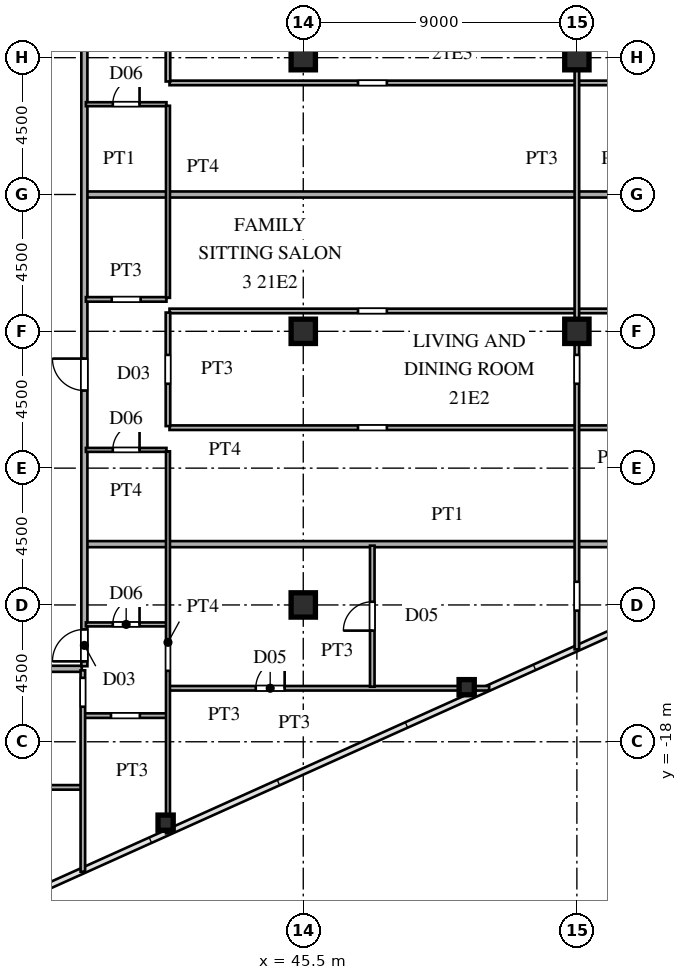
"""IFC4 building model, lengths in metres.
Left out: names, types, materials, properties, quantities, classifications, styles, units other than length and angle.
Written with IfcOpenShell. Run it as: python <this file> out.ifc"""

import sys

from ifc_helpers import new_model, si_unit, direction, frame, frame_2d, origin, origin_2d, place, context, subcontext, project, spatial, rectangle, hollow_rectangle, i_section, extrude, source, transform, mapped, element, fill, save


model = new_model("IFC4")
c1 = context("Model", 3, precision=1e-05, world=origin(), true_north=direction((0.0, 1.0)))
c2 = subcontext(c1, "Body", "Model", "MODEL_VIEW")
j1 = project(units=[si_unit("LENGTHUNIT", "METRE"), si_unit("PLANEANGLEUNIT", "RADIAN")], contexts=[c1])
p1 = place(None, origin())
s1 = spatial("IfcSite", under=j1, at=p1, CompositionType="ELEMENT")
p2 = place(p1, origin())
s2 = spatial("IfcBuilding", under=s1, at=p2, CompositionType="ELEMENT")
p3 = place(p2, frame((0.0, 0.0, 80.1)))
s3 = spatial("IfcBuildingStorey", under=s2, at=p3, CompositionType="ELEMENT", Elevation=80.1)
m1 = source(origin(), c2, "Body", "SweptSolid", [
    extrude(i_section(OverallWidth=0.8, OverallDepth=0.8, WebThickness=0.032, FlangeThickness=0.05, at=origin_2d()), origin(), (0.0, 0.0, 1.0), 3.6),
])
for number, where, z_axis, x_axis in (
    (1, (45.5, -13.5, 0.0), (0.0, 0.0, 1.0), (1.0, 0.0, 0.0)),
    (2, (45.5, -4.5, 0.0), (0.0, 0.0, 1.0), (1.0, 0.0, 0.0)),
    (3, (45.5, 4.5, 0.0), (0.0, 0.0, 1.0), (1.0, 0.0, 0.0)),
    (4, (54.5, -4.5, 0.0), (0.0, 0.0, 1.0), (1.0, 0.0, 0.0)),
    (5, (54.5, 4.5, 0.0), (0.0, 0.0, 1.0), (1.0, 0.0, 0.0)),
):
    element("IfcColumn", number, at=place(p3, frame(where, z_axis=z_axis, x_axis=x_axis)), inside=s3, PredefinedType="COLUMN", context=c2, shape_type="MappedRepresentation", body=[
        mapped(m1, transform((0.0, 0.0, 0.0), scale=1.0)),
    ])
m2 = source(origin(), c2, "Body", "SweptSolid", [
    extrude(hollow_rectangle(XDim=0.5, YDim=0.5, WallThickness=0.02, at=origin_2d()), origin(), (0.0, 0.0, 1.0), 3.6),
])
for number, where, z_axis, x_axis in (
    (6, (40.973, -20.661, 0.0), (0.0, 0.0, 1.0), (1.0, 0.0, 0.0)),
    (7, (50.875, -16.205, 0.0), (0.0, 0.0, 1.0), (1.0, 0.0, 0.0)),
):
    element("IfcColumn", number, at=place(p3, frame(where, z_axis=z_axis, x_axis=x_axis)), inside=s3, PredefinedType="COLUMN", context=c2, shape_type="MappedRepresentation", body=[
        mapped(m2, transform((0.0, 0.0, 0.0), scale=1.0)),
    ])
p4 = place(p3, frame((27.465, -19.5, 0.0), z_axis=(0.0, 0.0, 1.0), x_axis=(1.0, 0.0, 0.0)))
e8 = element("IfcWall", 8, at=p4, inside=s3, PredefinedType="PARTITIONING", context=c2, shape_type="SweptSolid", body=[
    extrude(rectangle(XDim=10.735, YDim=0.15, at=frame_2d((5.367, 0.0))), origin(), (0.0, 0.0, 1.0), 3.38),
])
p5 = place(p4, frame((4.935, 0.0, 0.0)))
e9 = element("IfcOpeningElement", 9, at=p5, cuts=e8, PredefinedType="OPENING", context=c2, shape_type="SweptSolid", body=[
    extrude(rectangle(XDim=0.95, YDim=2.15, at=frame_2d((0.475, 1.075))), frame((0.0, 0.085, 0.0), z_axis=(0.0, -1.0, 0.0), x_axis=(1.0, 0.0, 0.0)), (0.0, 0.0, 1.0), 0.17),
])
p6 = place(p3, frame((38.3, -17.14, 0.0), z_axis=(0.0, 0.0, 1.0), x_axis=(1.0, 0.0, 0.0)))
e10 = element("IfcWall", 10, at=p6, inside=s3, PredefinedType="PARTITIONING", context=c2, shape_type="SweptSolid", body=[
    extrude(rectangle(XDim=2.7, YDim=0.15, at=frame_2d((1.35, 0.0))), origin(), (0.0, 0.0, 1.0), 3.38),
])
p7 = place(p6, frame((0.875, 0.0, 0.0)))
e11 = element("IfcOpeningElement", 11, at=p7, cuts=e10, PredefinedType="OPENING", context=c2, shape_type="SweptSolid", body=[
    extrude(rectangle(XDim=0.95, YDim=2.15, at=frame_2d((0.475, 1.075))), frame((0.0, 0.085, 0.0), z_axis=(0.0, -1.0, 0.0), x_axis=(1.0, 0.0, 0.0)), (0.0, 0.0, 1.0), 0.17),
])
p8 = place(p3, frame((41.1, -16.24, 0.0), z_axis=(0.0, 0.0, 1.0), x_axis=(1.0, 0.0, 0.0)))
e12 = element("IfcWall", 12, at=p8, inside=s3, PredefinedType="PARTITIONING", context=c2, shape_type="SweptSolid", body=[
    extrude(rectangle(XDim=10.515, YDim=0.15, at=frame_2d((5.257, 0.0))), origin(), (0.0, 0.0, 1.0), 3.38),
])
p9 = place(p8, frame((2.837, 0.0, 0.0)))
e13 = element("IfcOpeningElement", 13, at=p9, cuts=e12, PredefinedType="OPENING", context=c2, shape_type="SweptSolid", body=[
    extrude(rectangle(XDim=0.95, YDim=2.15, at=frame_2d((0.475, 1.075))), frame((0.0, 0.085, 0.0), z_axis=(0.0, -1.0, 0.0), x_axis=(1.0, 0.0, 0.0)), (0.0, 0.0, 1.0), 0.17),
])
p10 = place(p3, frame((36.585, -15.6, 0.0), z_axis=(0.0, 0.0, 1.0), x_axis=(1.0, 0.0, 0.0)))
e14 = element("IfcWall", 14, at=p10, inside=s3, PredefinedType="PARTITIONING", context=c2, shape_type="SweptSolid", body=[
    extrude(rectangle(XDim=1.63, YDim=0.2, at=frame_2d((0.815, 0.0))), origin(), (0.0, 0.0, 1.0), 3.38),
])
p11 = place(p3, frame((38.35, -14.14, 0.0), z_axis=(0.0, 0.0, 1.0), x_axis=(1.0, 0.0, 0.0)))
e15 = element("IfcWall", 15, at=p11, inside=s3, PredefinedType="PARTITIONING", context=c2, shape_type="SweptSolid", body=[
    extrude(rectangle(XDim=2.65, YDim=0.13, at=frame_2d((1.325, 0.0))), origin(), (0.0, 0.0, 1.0), 3.38),
])
p12 = place(p11, frame((0.885, 0.0, 0.0)))
e16 = element("IfcOpeningElement", 16, at=p12, cuts=e15, PredefinedType="OPENING", context=c2, shape_type="SweptSolid", body=[
    extrude(rectangle(XDim=0.88, YDim=2.1, at=frame_2d((0.44, 1.05))), frame((0.0, 0.075, 0.0), z_axis=(0.0, -1.0, 0.0), x_axis=(1.0, 0.0, 0.0)), (0.0, 0.0, 1.0), 0.15),
])
p13 = place(p3, frame((38.38, -11.5, 0.0), z_axis=(0.0, 0.0, 1.0), x_axis=(1.0, 0.0, 0.0)))
e17 = element("IfcWall", 17, at=p13, inside=s3, PredefinedType="PARTITIONING", context=c2, shape_type="SweptSolid", body=[
    extrude(rectangle(XDim=23.743, YDim=0.2, at=frame_2d((11.872, 0.0))), origin(), (0.0, 0.0, 1.0), 3.38),
])
p14 = place(p3, frame((38.35, -8.4, 0.0), z_axis=(0.0, 0.0, 1.0), x_axis=(1.0, 0.0, 0.0)))
e18 = element("IfcWall", 18, at=p14, inside=s3, PredefinedType="PARTITIONING", context=c2, shape_type="SweptSolid", body=[
    extrude(rectangle(XDim=2.65, YDim=0.13, at=frame_2d((1.325, 0.0))), origin(), (0.0, 0.0, 1.0), 3.38),
])
p15 = place(p14, frame((0.885, 0.0, 0.0)))
e19 = element("IfcOpeningElement", 19, at=p15, cuts=e18, PredefinedType="OPENING", context=c2, shape_type="SweptSolid", body=[
    extrude(rectangle(XDim=0.88, YDim=2.1, at=frame_2d((0.44, 1.05))), frame((0.0, 0.075, 0.0), z_axis=(0.0, -1.0, 0.0), x_axis=(1.0, 0.0, 0.0)), (0.0, 0.0, 1.0), 0.15),
])
p16 = place(p3, frame((41.1, -7.67, 0.0), z_axis=(0.0, 0.0, 1.0), x_axis=(1.0, 0.0, 0.0)))
e20 = element("IfcWall", 20, at=p16, inside=s3, PredefinedType="PARTITIONING", context=c2, shape_type="SweptSolid", body=[
    extrude(rectangle(XDim=29.218, YDim=0.15, at=frame_2d((14.609, 0.0))), origin(), (0.0, 0.0, 1.0), 3.38),
])
p17 = place(p16, frame((6.2, 0.0, 0.0)))
e21 = element("IfcOpeningElement", 21, at=p17, cuts=e20, PredefinedType="OPENING", context=c2, shape_type="SweptSolid", body=[
    extrude(rectangle(XDim=0.95, YDim=2.15, at=frame_2d((0.475, 1.075))), frame((0.0, 0.085, 0.0), z_axis=(0.0, -1.0, 0.0), x_axis=(1.0, 0.0, 0.0)), (0.0, 0.0, 1.0), 0.17),
])
p18 = place(p16, frame((15.775, 0.0, 0.0)))
e22 = element("IfcOpeningElement", 22, at=p18, cuts=e20, PredefinedType="OPENING", context=c2, shape_type="SweptSolid", body=[
    extrude(rectangle(XDim=0.95, YDim=2.15, at=frame_2d((0.475, 1.075))), frame((0.0, 0.085, 0.0), z_axis=(0.0, -1.0, 0.0), x_axis=(1.0, 0.0, 0.0)), (0.0, 0.0, 1.0), 0.17),
])
p19 = place(p3, frame((41.1, -3.83, 0.0), z_axis=(0.0, 0.0, 1.0), x_axis=(1.0, 0.0, 0.0)))
e23 = element("IfcWall", 23, at=p19, inside=s3, PredefinedType="PARTITIONING", context=c2, shape_type="SweptSolid", body=[
    extrude(rectangle(XDim=29.935, YDim=0.15, at=frame_2d((14.967, 0.0))), origin(), (0.0, 0.0, 1.0), 3.38),
])
p20 = place(p19, frame((6.2, 0.0, 0.0)))
e24 = element("IfcOpeningElement", 24, at=p20, cuts=e23, PredefinedType="OPENING", context=c2, shape_type="SweptSolid", body=[
    extrude(rectangle(XDim=0.95, YDim=2.15, at=frame_2d((0.475, 1.075))), frame((0.0, 0.085, 0.0), z_axis=(0.0, -1.0, 0.0), x_axis=(1.0, 0.0, 0.0)), (0.0, 0.0, 1.0), 0.17),
])
p21 = place(p19, frame((15.775, 0.0, 0.0)))
e25 = element("IfcOpeningElement", 25, at=p21, cuts=e23, PredefinedType="OPENING", context=c2, shape_type="SweptSolid", body=[
    extrude(rectangle(XDim=0.95, YDim=2.15, at=frame_2d((0.475, 1.075))), frame((0.0, 0.085, 0.0), z_axis=(0.0, -1.0, 0.0), x_axis=(1.0, 0.0, 0.0)), (0.0, 0.0, 1.0), 0.17),
])
p22 = place(p3, frame((38.35, -3.45, 0.0), z_axis=(0.0, 0.0, 1.0), x_axis=(1.0, 0.0, 0.0)))
e26 = element("IfcWall", 26, at=p22, inside=s3, PredefinedType="PARTITIONING", context=c2, shape_type="SweptSolid", body=[
    extrude(rectangle(XDim=2.65, YDim=0.15, at=frame_2d((1.325, 0.0))), origin(), (0.0, 0.0, 1.0), 3.38),
])
p23 = place(p22, frame((0.85, 0.0, 0.0)))
e27 = element("IfcOpeningElement", 27, at=p23, cuts=e26, PredefinedType="OPENING", context=c2, shape_type="SweptSolid", body=[
    extrude(rectangle(XDim=0.95, YDim=2.15, at=frame_2d((0.475, 1.075))), frame((0.0, 0.085, 0.0), z_axis=(0.0, -1.0, 0.0), x_axis=(1.0, 0.0, 0.0)), (0.0, 0.0, 1.0), 0.17),
])
p24 = place(p3, frame((38.38, 0.0, 0.0), z_axis=(0.0, 0.0, 1.0), x_axis=(1.0, 0.0, 0.0)))
e28 = element("IfcWall", 28, at=p24, inside=s3, PredefinedType="PARTITIONING", context=c2, shape_type="SweptSolid", body=[
    extrude(rectangle(XDim=25.1, YDim=0.2, at=frame_2d((12.55, 0.0))), origin(), (0.0, 0.0, 1.0), 3.38),
])
p25 = place(p3, frame((38.35, 2.97, 0.0), z_axis=(0.0, 0.0, 1.0), x_axis=(1.0, 0.0, 0.0)))
e29 = element("IfcWall", 29, at=p25, inside=s3, PredefinedType="PARTITIONING", context=c2, shape_type="SweptSolid", body=[
    extrude(rectangle(XDim=2.65, YDim=0.13, at=frame_2d((1.325, 0.0))), origin(), (0.0, 0.0, 1.0), 3.38),
])
p26 = place(p25, frame((0.885, 0.0, 0.0)))
e30 = element("IfcOpeningElement", 30, at=p26, cuts=e29, PredefinedType="OPENING", context=c2, shape_type="SweptSolid", body=[
    extrude(rectangle(XDim=0.88, YDim=2.1, at=frame_2d((0.44, 1.05))), frame((0.0, 0.075, 0.0), z_axis=(0.0, -1.0, 0.0), x_axis=(1.0, 0.0, 0.0)), (0.0, 0.0, 1.0), 0.15),
])
p27 = place(p3, frame((41.1, 3.67, 0.0), z_axis=(0.0, 0.0, 1.0), x_axis=(1.0, 0.0, 0.0)))
e31 = element("IfcWall", 31, at=p27, inside=s3, PredefinedType="PARTITIONING", context=c2, shape_type="SweptSolid", body=[
    extrude(rectangle(XDim=29.935, YDim=0.15, at=frame_2d((14.967, 0.0))), origin(), (0.0, 0.0, 1.0), 3.38),
])
p28 = place(p27, frame((6.2, 0.0, 0.0)))
e32 = element("IfcOpeningElement", 32, at=p28, cuts=e31, PredefinedType="OPENING", context=c2, shape_type="SweptSolid", body=[
    extrude(rectangle(XDim=0.95, YDim=2.15, at=frame_2d((0.475, 1.075))), frame((0.0, 0.085, 0.0), z_axis=(0.0, -1.0, 0.0), x_axis=(1.0, 0.0, 0.0)), (0.0, 0.0, 1.0), 0.17),
])
p29 = place(p27, frame((15.775, 0.0, 0.0)))
e33 = element("IfcOpeningElement", 33, at=p29, cuts=e31, PredefinedType="OPENING", context=c2, shape_type="SweptSolid", body=[
    extrude(rectangle(XDim=0.95, YDim=2.15, at=frame_2d((0.475, 1.075))), frame((0.0, 0.085, 0.0), z_axis=(0.0, -1.0, 0.0), x_axis=(1.0, 0.0, 0.0)), (0.0, 0.0, 1.0), 0.17),
])
p30 = place(p3, frame((38.25, -22.273, 0.0), z_axis=(0.0, 0.0, 1.0), x_axis=(0.0, 1.0, 0.0)))
e34 = element("IfcWall", 34, at=p30, inside=s3, PredefinedType="PARTITIONING", context=c2, shape_type="SweptSolid", body=[
    extrude(rectangle(XDim=6.623, YDim=0.15, at=frame_2d((3.312, 0.0))), origin(), (0.0, 0.0, 1.0), 3.38),
])
p31 = place(p30, frame((5.426, 0.0, 0.0)))
e35 = element("IfcOpeningElement", 35, at=p31, cuts=e34, PredefinedType="OPENING", context=c2, shape_type="SweptSolid", body=[
    extrude(rectangle(XDim=0.95, YDim=2.15, at=frame_2d((0.475, 1.075))), frame((0.0, 0.085, 0.0), z_axis=(0.0, -1.0, 0.0), x_axis=(1.0, 0.0, 0.0)), (0.0, 0.0, 1.0), 0.17),
])
p32 = place(p3, frame((38.3, -15.515, 0.0), z_axis=(0.0, 0.0, 1.0), x_axis=(0.0, 1.0, 0.0)))
e36 = element("IfcWall", 36, at=p32, inside=s3, PredefinedType="PARTITIONING", context=c2, shape_type="SweptSolid", body=[
    extrude(rectangle(XDim=31.03, YDim=0.2, at=frame_2d((15.515, 0.0))), origin(), (0.0, 0.0, 1.0), 3.38),
])
p33 = place(p32, frame((0.16, 0.0, 0.0)))
e37 = element("IfcOpeningElement", 37, at=p33, cuts=e36, PredefinedType="OPENING", context=c2, shape_type="SweptSolid", body=[
    extrude(rectangle(XDim=1.05, YDim=2.25, at=frame_2d((0.525, 1.125))), frame((0.0, 0.11, 0.0), z_axis=(0.0, -1.0, 0.0), x_axis=(1.0, 0.0, 0.0)), (0.0, 0.0, 1.0), 0.22),
])
p34 = place(p32, frame((9.067, 0.0, 0.0)))
e38 = element("IfcOpeningElement", 38, at=p34, cuts=e36, PredefinedType="OPENING", context=c2, shape_type="SweptSolid", body=[
    extrude(rectangle(XDim=1.05, YDim=2.25, at=frame_2d((0.525, 1.125))), frame((0.0, 0.11, 0.0), z_axis=(0.0, -1.0, 0.0), x_axis=(1.0, 0.0, 0.0)), (0.0, 0.0, 1.0), 0.22),
])
p35 = place(p32, frame((20.325, 0.0, 0.0)))
e39 = element("IfcOpeningElement", 39, at=p35, cuts=e36, PredefinedType="OPENING", context=c2, shape_type="SweptSolid", body=[
    extrude(rectangle(XDim=1.05, YDim=2.25, at=frame_2d((0.525, 1.125))), frame((0.0, 0.11, 0.0), z_axis=(0.0, -1.0, 0.0), x_axis=(1.0, 0.0, 0.0)), (0.0, 0.0, 1.0), 0.22),
])
p36 = place(p32, frame((29.613, 0.0, 0.0)))
e40 = element("IfcOpeningElement", 40, at=p36, cuts=e36, PredefinedType="OPENING", context=c2, shape_type="SweptSolid", body=[
    extrude(rectangle(XDim=1.05, YDim=2.25, at=frame_2d((0.525, 1.125))), frame((0.0, 0.11, 0.0), z_axis=(0.0, -1.0, 0.0), x_axis=(1.0, 0.0, 0.0)), (0.0, 0.0, 1.0), 0.22),
])
p37 = place(p3, frame((41.05, -21.012, 0.0), z_axis=(0.0, 0.0, 1.0), x_axis=(0.0, 1.0, 0.0)))
e41 = element("IfcWall", 41, at=p37, inside=s3, PredefinedType="PARTITIONING", context=c2, shape_type="SweptSolid", body=[
    extrude(rectangle(XDim=12.565, YDim=0.13, at=frame_2d((6.282, 0.0))), origin(), (0.0, 0.0, 1.0), 2.99),
])
p38 = place(p37, frame((5.345, 0.0, 0.0)))
e42 = element("IfcOpeningElement", 42, at=p38, cuts=e41, PredefinedType="OPENING", context=c2, shape_type="SweptSolid", body=[
    extrude(rectangle(XDim=0.95, YDim=2.15, at=frame_2d((0.475, 1.075))), frame((0.0, 0.075, 0.0), z_axis=(0.0, -1.0, 0.0), x_axis=(1.0, 0.0, 0.0)), (0.0, 0.0, 1.0), 0.15),
])
p39 = place(p3, frame((41.05, -7.617, 0.0), z_axis=(0.0, 0.0, 1.0), x_axis=(0.0, 1.0, 0.0)))
e43 = element("IfcWall", 43, at=p39, inside=s3, PredefinedType="PARTITIONING", context=c2, shape_type="SweptSolid", body=[
    extrude(rectangle(XDim=3.734, YDim=0.15, at=frame_2d((1.867, 0.0))), origin(), (0.0, 0.0, 1.0), 2.99),
])
p40 = place(p39, frame((1.392, 0.0, 0.0)))
e44 = element("IfcOpeningElement", 44, at=p40, cuts=e43, PredefinedType="OPENING", context=c2, shape_type="SweptSolid", body=[
    extrude(rectangle(XDim=0.95, YDim=2.15, at=frame_2d((0.475, 1.075))), frame((0.0, 0.085, 0.0), z_axis=(0.0, -1.0, 0.0), x_axis=(1.0, 0.0, 0.0)), (0.0, 0.0, 1.0), 0.17),
])
p41 = place(p3, frame((41.05, -3.398, 0.0), z_axis=(0.0, 0.0, 1.0), x_axis=(0.0, 1.0, 0.0)))
e45 = element("IfcWall", 45, at=p41, inside=s3, PredefinedType="PARTITIONING", context=c2, shape_type="SweptSolid", body=[
    extrude(rectangle(XDim=6.316, YDim=0.13, at=frame_2d((3.158, 0.0))), origin(), (0.0, 0.0, 1.0), 2.99),
])
p42 = place(p3, frame((41.05, 3.717, 0.0), z_axis=(0.0, 0.0, 1.0), x_axis=(0.0, 1.0, 0.0)))
e46 = element("IfcWall", 46, at=p42, inside=s3, PredefinedType="PARTITIONING", context=c2, shape_type="SweptSolid", body=[
    extrude(rectangle(XDim=3.566, YDim=0.15, at=frame_2d((1.783, 0.0))), origin(), (0.0, 0.0, 1.0), 2.99),
])
p43 = place(p42, frame((1.308, 0.0, 0.0)))
e47 = element("IfcOpeningElement", 47, at=p43, cuts=e46, PredefinedType="OPENING", context=c2, shape_type="SweptSolid", body=[
    extrude(rectangle(XDim=0.95, YDim=2.15, at=frame_2d((0.475, 1.075))), frame((0.0, 0.085, 0.0), z_axis=(0.0, -1.0, 0.0), x_axis=(1.0, 0.0, 0.0)), (0.0, 0.0, 1.0), 0.17),
])
p44 = place(p3, frame((47.77, -16.189, 0.0), z_axis=(0.0, 0.0, 1.0), x_axis=(0.0, 1.0, 0.0)))
e48 = element("IfcWall", 48, at=p44, inside=s3, PredefinedType="PARTITIONING", context=c2, shape_type="SweptSolid", body=[
    extrude(rectangle(XDim=4.639, YDim=0.15, at=frame_2d((2.319, 0.0))), origin(), (0.0, 0.0, 1.0), 3.38),
])
p45 = place(p44, frame((1.844, 0.0, 0.0)))
e49 = element("IfcOpeningElement", 49, at=p45, cuts=e48, PredefinedType="OPENING", context=c2, shape_type="SweptSolid", body=[
    extrude(rectangle(XDim=0.95, YDim=2.15, at=frame_2d((0.475, 1.075))), frame((0.0, 0.085, 0.0), z_axis=(0.0, -1.0, 0.0), x_axis=(1.0, 0.0, 0.0)), (0.0, 0.0, 1.0), 0.17),
])
p46 = place(p3, frame((54.5, -14.96, 0.0), z_axis=(0.0, 0.0, 1.0), x_axis=(0.0, 1.0, 0.0)))
e50 = element("IfcWall", 50, at=p46, inside=s3, PredefinedType="PARTITIONING", context=c2, shape_type="SweptSolid", body=[
    extrude(rectangle(XDim=29.92, YDim=0.15, at=frame_2d((14.96, 0.0))), origin(), (0.0, 0.0, 1.0), 2.68),
])
p47 = place(p46, frame((1.272, 0.0, 0.0)))
e51 = element("IfcOpeningElement", 51, at=p47, cuts=e50, PredefinedType="OPENING", context=c2, shape_type="SweptSolid", body=[
    extrude(rectangle(XDim=0.95, YDim=2.15, at=frame_2d((0.475, 1.075))), frame((0.0, 0.085, 0.0), z_axis=(0.0, -1.0, 0.0), x_axis=(1.0, 0.0, 0.0)), (0.0, 0.0, 1.0), 0.17),
])
p48 = place(p46, frame((8.735, 0.0, 0.0)))
e52 = element("IfcOpeningElement", 52, at=p48, cuts=e50, PredefinedType="OPENING", context=c2, shape_type="SweptSolid", body=[
    extrude(rectangle(XDim=0.95, YDim=2.15, at=frame_2d((0.475, 1.075))), frame((0.0, 0.085, 0.0), z_axis=(0.0, -1.0, 0.0), x_axis=(1.0, 0.0, 0.0)), (0.0, 0.0, 1.0), 0.17),
])
p49 = place(p46, frame((19.985, 0.0, 0.0)))
e53 = element("IfcOpeningElement", 53, at=p49, cuts=e50, PredefinedType="OPENING", context=c2, shape_type="SweptSolid", body=[
    extrude(rectangle(XDim=0.95, YDim=2.15, at=frame_2d((0.475, 1.075))), frame((0.0, 0.085, 0.0), z_axis=(0.0, -1.0, 0.0), x_axis=(1.0, 0.0, 0.0)), (0.0, 0.0, 1.0), 0.17),
])
p50 = place(p46, frame((27.448, 0.0, 0.0)))
e54 = element("IfcOpeningElement", 54, at=p50, cuts=e50, PredefinedType="OPENING", context=c2, shape_type="SweptSolid", body=[
    extrude(rectangle(XDim=0.95, YDim=2.15, at=frame_2d((0.475, 1.075))), frame((0.0, 0.085, 0.0), z_axis=(0.0, -1.0, 0.0), x_axis=(1.0, 0.0, 0.0)), (0.0, 0.0, 1.0), 0.17),
])
m3 = source(origin(), c2, "Body", "SweptSolid", [
    extrude(rectangle(XDim=0.95, YDim=2.15, at=frame_2d((0.475, 1.075))), frame((0.0, 0.025, 0.0), z_axis=(0.0, -1.0, 0.0), x_axis=(1.0, 0.0, 0.0)), (0.0, 0.0, 1.0), 0.05),
])
p51 = place(p9, origin())
e55 = element("IfcDoor", 55, at=p51, inside=s3, OperationType="SINGLE_SWING_RIGHT", PredefinedType="DOOR", context=c2, shape_type="MappedRepresentation", body=[
    mapped(m3, transform((0.0, 0.0, 0.0), scale=1.0)),
])
fill(e13, e55)
m4 = source(origin(), c2, "Body", "SweptSolid", [
    extrude(rectangle(XDim=0.88, YDim=2.1, at=frame_2d((0.44, 1.05))), frame((0.0, 0.025, 0.0), z_axis=(0.0, -1.0, 0.0), x_axis=(1.0, 0.0, 0.0)), (0.0, 0.0, 1.0), 0.05),
])
p52 = place(p12, origin())
e56 = element("IfcDoor", 56, at=p52, inside=s3, OperationType="SINGLE_SWING_RIGHT", PredefinedType="DOOR", context=c2, shape_type="MappedRepresentation", body=[
    mapped(m4, transform((0.0, 0.0, 0.0), scale=1.0)),
])
fill(e16, e56)
p53 = place(p15, origin())
e57 = element("IfcDoor", 57, at=p53, inside=s3, OperationType="SINGLE_SWING_RIGHT", PredefinedType="DOOR", context=c2, shape_type="MappedRepresentation", body=[
    mapped(m4, transform((0.0, 0.0, 0.0), scale=1.0)),
])
fill(e19, e57)
p54 = place(p26, origin())
e58 = element("IfcDoor", 58, at=p54, inside=s3, OperationType="SINGLE_SWING_RIGHT", PredefinedType="DOOR", context=c2, shape_type="MappedRepresentation", body=[
    mapped(m4, transform((0.0, 0.0, 0.0), scale=1.0)),
])
fill(e30, e58)
m5 = source(origin(), c2, "Body", "SweptSolid", [
    extrude(rectangle(XDim=1.05, YDim=2.25, at=frame_2d((0.525, 1.125))), frame((0.0, 0.025, 0.0), z_axis=(0.0, -1.0, 0.0), x_axis=(1.0, 0.0, 0.0)), (0.0, 0.0, 1.0), 0.05),
])
p55 = place(p33, origin())
e59 = element("IfcDoor", 59, at=p55, inside=s3, OperationType="SINGLE_SWING_LEFT", PredefinedType="DOOR", context=c2, shape_type="MappedRepresentation", body=[
    mapped(m5, transform((0.0, 0.0, 0.0), scale=1.0)),
])
fill(e37, e59)
p56 = place(p34, origin())
e60 = element("IfcDoor", 60, at=p56, inside=s3, OperationType="SINGLE_SWING_RIGHT", PredefinedType="DOOR", context=c2, shape_type="MappedRepresentation", body=[
    mapped(m5, transform((0.0, 0.0, 0.0), scale=1.0)),
])
fill(e38, e60)
p57 = place(p45, origin())
e61 = element("IfcDoor", 61, at=p57, inside=s3, OperationType="SINGLE_SWING_LEFT", PredefinedType="DOOR", context=c2, shape_type="MappedRepresentation", body=[
    mapped(m3, transform((0.0, 0.0, 0.0), scale=1.0)),
])
fill(e49, e61)
save(model, sys.argv[1])
